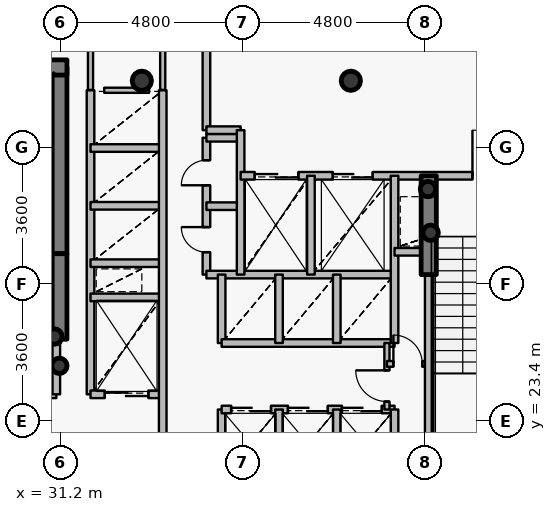
"""IFC4 building model, lengths in metres.
Left out: names, types, materials, properties, quantities, classifications, styles, units other than length and angle.
Written with IfcOpenShell. Run it as: python <this file> out.ifc"""

import sys

from ifc_helpers import new_model, si_unit, direction, frame, frame_2d, origin, origin_2d, place, context, subcontext, project, spatial, rectangle, hollow_circle, extrude, source, transform, mapped, element, fill, save


model = new_model("IFC4")
c1 = context("Model", 3, precision=1e-05, world=origin(), true_north=direction((0.0, 1.0)))
c2 = subcontext(c1, "Body", "Model", "MODEL_VIEW")
j1 = project(units=[si_unit("LENGTHUNIT", "METRE"), si_unit("PLANEANGLEUNIT", "RADIAN")], contexts=[c1])
p1 = place(None, origin())
s1 = spatial("IfcSite", under=j1, at=p1, CompositionType="ELEMENT")
p2 = place(p1, origin())
s2 = spatial("IfcBuilding", under=s1, at=p2, CompositionType="ELEMENT")
p3 = place(p2, frame((0.0, 0.0, 100.95)))
s3 = spatial("IfcBuildingStorey", under=s2, at=p3, CompositionType="ELEMENT", Elevation=100.95)
for number, where, z_axis, x_axis in (
    (1, (38.85, 32.35, 0.0), (0.0, 0.0, 1.0), (1.0, 0.0, 0.0)),
    (2, (33.35, 32.35, 0.0), (0.0, 0.0, 1.0), (1.0, 0.0, 0.0)),
):
    element("IfcColumn", number, at=place(p3, frame(where, z_axis=z_axis, x_axis=x_axis)), inside=s3, PredefinedType="COLUMN", context=c2, shape_type="SweptSolid", body=[
        extrude(hollow_circle(Radius=0.254, WallThickness=0.02, at=origin_2d()), origin(), (0.0, 0.0, 1.0), 3.75),
    ])
p4 = place(p3, frame((31.18, 27.8, 0.0), z_axis=(0.0, 0.0, 1.0), x_axis=(0.0, 1.0, 0.0)))
e3 = element("IfcWall", 3, at=p4, inside=s3, PredefinedType="SHEAR", context=c2, shape_type="SweptSolid", body=[
    extrude(rectangle(XDim=4.9, YDim=0.4, at=frame_2d((2.45, 0.0))), origin(), (0.0, 0.0, 1.0), 3.75),
])
p5 = place(p3, frame((27.28, 32.7, 0.0), z_axis=(0.0, 0.0, 1.0), x_axis=(1.0, 0.0, 0.0)))
e4 = element("IfcWall", 4, at=p5, inside=s3, PredefinedType="SHEAR", context=c2, shape_type="SweptSolid", body=[
    extrude(rectangle(XDim=4.1, YDim=0.4, at=frame_2d((2.05, 0.0))), origin(), (0.0, 0.0, 1.0), 3.75),
])
for number, where, z_axis, x_axis in (
    (5, (31.05, 25.62, 0.0), (0.0, 0.0, 1.0), (1.0, 0.0, 0.0)),
    (6, (31.18, 24.85, 0.0), (0.0, 0.0, 1.0), (1.0, 0.0, 0.0)),
    (7, (40.95, 28.35, 0.0), (0.0, 0.0, 1.0), (1.0, 0.0, 0.0)),
    (8, (40.88, 29.5, 0.0), (0.0, 0.0, 1.0), (1.0, 0.0, 0.0)),
):
    element("IfcColumn", number, at=place(p3, frame(where, z_axis=z_axis, x_axis=x_axis)), inside=s3, PredefinedType="COLUMN", context=c2, shape_type="SweptSolid", body=[
        extrude(hollow_circle(Radius=0.203, WallThickness=0.016, at=origin_2d()), origin(), (0.0, 0.0, 1.0), 3.75),
    ])
p6 = place(p3, frame((31.18, 25.55, 0.0), z_axis=(0.0, 0.0, 1.0), x_axis=(0.0, 1.0, 0.0)))
e9 = element("IfcWall", 9, at=p6, inside=s3, PredefinedType="SHEAR", context=c2, shape_type="SweptSolid", body=[
    extrude(rectangle(XDim=2.25, YDim=0.4, at=frame_2d((1.125, 0.0))), origin(), (0.0, 0.0, 1.0), 3.1),
])
p7 = place(p3, frame((40.9, 27.25, 0.0), z_axis=(0.0, 0.0, 1.0), x_axis=(0.0, 1.0, 0.0)))
e10 = element("IfcWall", 10, at=p7, inside=s3, PredefinedType="SHEAR", context=c2, shape_type="SweptSolid", body=[
    extrude(rectangle(XDim=2.6, YDim=0.4, at=frame_2d((1.3, 0.0))), origin(), (0.0, 0.0, 1.0), 3.1),
])
p8 = place(p3, frame((27.56, 24.1, 0.0), z_axis=(0.0, 0.0, 1.0), x_axis=(1.0, 0.0, 0.0)))
e11 = element("IfcWall", 11, at=p8, inside=s3, PredefinedType="PARTITIONING", context=c2, shape_type="SweptSolid", body=[
    extrude(rectangle(XDim=3.54, YDim=0.2, at=frame_2d((1.77, 0.0))), origin(), (0.0, 0.0, 1.0), 3.5),
])
p9 = place(p8, frame((1.17, 0.0, 0.0)))
e12 = element("IfcOpeningElement", 12, at=p9, cuts=e11, PredefinedType="OPENING", context=c2, shape_type="SweptSolid", body=[
    extrude(rectangle(XDim=1.2, YDim=2.15, at=origin_2d()), frame((0.6, 0.11, 1.075), z_axis=(0.0, -1.0, 0.0), x_axis=(1.0, 0.0, 0.0)), (0.0, 0.0, 1.0), 0.22),
])
p10 = place(p3, frame((31.1, 24.1, 0.0), z_axis=(0.0, 0.0, 1.0), x_axis=(0.0, 1.0, 0.0)))
e13 = element("IfcWall", 13, at=p10, inside=s3, PredefinedType="PARTITIONING", context=c2, shape_type="SweptSolid", body=[
    extrude(rectangle(XDim=1.44, YDim=0.2, at=frame_2d((0.72, 0.0))), origin(), (0.0, 0.0, 1.0), 3.5),
])
p11 = place(p3, frame((32.0, 24.1, 0.0), z_axis=(0.0, 0.0, 1.0), x_axis=(0.0, 1.0, 0.0)))
e14 = element("IfcWall", 14, at=p11, inside=s3, PredefinedType="PARTITIONING", context=c2, shape_type="SweptSolid", body=[
    extrude(rectangle(XDim=8.0, YDim=0.2, at=frame_2d((4.0, 0.0))), origin(), (0.0, 0.0, 1.0), 3.5),
])
p12 = place(p3, frame((32.0, 24.1, 0.0), z_axis=(0.0, 0.0, 1.0), x_axis=(1.0, 0.0, 0.0)))
e15 = element("IfcWall", 15, at=p12, inside=s3, PredefinedType="PARTITIONING", context=c2, shape_type="SweptSolid", body=[
    extrude(rectangle(XDim=1.9, YDim=0.2, at=frame_2d((0.95, 0.0))), origin(), (0.0, 0.0, 1.0), 3.085),
])
p13 = place(p12, frame((0.375, 0.0, 0.0)))
e16 = element("IfcOpeningElement", 16, at=p13, cuts=e15, PredefinedType="OPENING", context=c2, shape_type="SweptSolid", body=[
    extrude(rectangle(XDim=1.15, YDim=2.15, at=origin_2d()), frame((0.575, 0.11, 1.075), z_axis=(0.0, -1.0, 0.0), x_axis=(1.0, 0.0, 0.0)), (0.0, 0.0, 1.0), 0.22),
])
for number, where, z_axis, x_axis in (
    (17, (32.0, 26.65, 0.0), (0.0, 0.0, 1.0), (1.0, 0.0, 0.0)),
    (18, (32.0, 27.55, 0.0), (0.0, 0.0, 1.0), (1.0, 0.0, 0.0)),
    (19, (32.0, 29.06, 0.0), (0.0, 0.0, 1.0), (1.0, 0.0, 0.0)),
    (20, (32.0, 30.58, 0.0), (0.0, 0.0, 1.0), (1.0, 0.0, 0.0)),
):
    element("IfcWall", number, at=place(p3, frame(where, z_axis=z_axis, x_axis=x_axis)), inside=s3, PredefinedType="PARTITIONING", context=c2, shape_type="SweptSolid", body=[
        extrude(rectangle(XDim=1.9, YDim=0.2, at=frame_2d((0.95, 0.0))), origin(), (0.0, 0.0, 1.0), 3.085),
    ])
p14 = place(p3, frame((33.9, 20.6, 0.0), z_axis=(0.0, 0.0, 1.0), x_axis=(0.0, 1.0, 0.0)))
e21 = element("IfcWall", 21, at=p14, inside=s3, PredefinedType="PARTITIONING", context=c2, shape_type="SweptSolid", body=[
    extrude(rectangle(XDim=11.5, YDim=0.2, at=frame_2d((5.75, 0.0))), origin(), (0.0, 0.0, 1.0), 3.085),
])
p15 = place(p3, frame((35.05, 27.25, 0.0), z_axis=(0.0, 0.0, 1.0), x_axis=(0.0, 1.0, 0.0)))
e22 = element("IfcWall", 22, at=p15, inside=s3, PredefinedType="PARTITIONING", context=c2, shape_type="SweptSolid", body=[
    extrude(rectangle(XDim=3.6, YDim=0.2, at=frame_2d((1.8, 0.0))), origin(), (0.0, 0.0, 1.0), 3.5),
])
p16 = place(p15, frame((0.59, 0.0, 0.0)))
e23 = element("IfcOpeningElement", 23, at=p16, cuts=e22, PredefinedType="OPENING", context=c2, shape_type="SweptSolid", body=[
    extrude(rectangle(XDim=0.66, YDim=2.05, at=origin_2d()), frame((0.33, 0.11, 1.025), z_axis=(0.0, -1.0, 0.0), x_axis=(1.0, 0.0, 0.0)), (0.0, 0.0, 1.0), 0.22),
])
p17 = place(p15, frame((2.35, 0.0, 0.0)))
e24 = element("IfcOpeningElement", 24, at=p17, cuts=e22, PredefinedType="OPENING", context=c2, shape_type="SweptSolid", body=[
    extrude(rectangle(XDim=0.66, YDim=2.05, at=origin_2d()), frame((0.33, 0.11, 1.025), z_axis=(0.0, -1.0, 0.0), x_axis=(1.0, 0.0, 0.0)), (0.0, 0.0, 1.0), 0.22),
])
p18 = place(p3, frame((35.05, 27.25, 0.0), z_axis=(0.0, 0.0, 1.0), x_axis=(1.0, 0.0, 0.0)))
e25 = element("IfcWall", 25, at=p18, inside=s3, PredefinedType="PARTITIONING", context=c2, shape_type="SweptSolid", body=[
    extrude(rectangle(XDim=4.95, YDim=0.2, at=frame_2d((2.475, 0.0))), origin(), (0.0, 0.0, 1.0), 3.085),
])
for number, where, z_axis, x_axis in (
    (26, (35.05, 29.05, 0.0), (0.0, 0.0, 1.0), (1.0, 0.0, 0.0)),
    (27, (35.05, 30.85, 0.0), (0.0, 0.0, 1.0), (1.0, 0.0, 0.0)),
):
    element("IfcWall", number, at=place(p3, frame(where, z_axis=z_axis, x_axis=x_axis)), inside=s3, PredefinedType="PARTITIONING", context=c2, shape_type="SweptSolid", body=[
        extrude(rectangle(XDim=0.9, YDim=0.2, at=frame_2d((0.45, 0.0))), origin(), (0.0, 0.0, 1.0), 3.5),
    ])
p19 = place(p3, frame((35.05, 31.05, 0.0), z_axis=(0.0, 0.0, 1.0), x_axis=(0.0, 1.0, 0.0)))
e28 = element("IfcWall", 28, at=p19, inside=s3, PredefinedType="PARTITIONING", context=c2, shape_type="SweptSolid", body=[
    extrude(rectangle(XDim=2.35, YDim=0.2, at=frame_2d((1.175, 0.0))), origin(), (0.0, 0.0, 1.0), 3.085),
])
p20 = place(p3, frame((35.05, 31.05, 0.0), z_axis=(0.0, 0.0, 1.0), x_axis=(1.0, 0.0, 0.0)))
e29 = element("IfcWall", 29, at=p20, inside=s3, PredefinedType="PARTITIONING", context=c2, shape_type="SweptSolid", body=[
    extrude(rectangle(XDim=0.9, YDim=0.2, at=frame_2d((0.45, 0.0))), origin(), (0.0, 0.0, 1.0), 3.5),
])
p21 = place(p3, frame((35.45, 21.9, 0.0), z_axis=(0.0, 0.0, 1.0), x_axis=(0.0, 1.0, 0.0)))
e30 = element("IfcWall", 30, at=p21, inside=s3, PredefinedType="PARTITIONING", context=c2, shape_type="SweptSolid", body=[
    extrude(rectangle(XDim=1.8, YDim=0.2, at=frame_2d((0.9, 0.0))), origin(), (0.0, 0.0, 1.0), 3.5),
])
p22 = place(p3, frame((35.45, 23.7, 0.0), z_axis=(0.0, 0.0, 1.0), x_axis=(1.0, 0.0, 0.0)))
e31 = element("IfcWall", 31, at=p22, inside=s3, PredefinedType="PARTITIONING", context=c2, shape_type="SweptSolid", body=[
    extrude(rectangle(XDim=4.55, YDim=0.2, at=frame_2d((2.275, 0.0))), origin(), (0.0, 0.0, 1.0), 3.085),
])
p23 = place(p22, frame((0.25, 0.0, 0.0)))
e32 = element("IfcOpeningElement", 32, at=p23, cuts=e31, PredefinedType="OPENING", context=c2, shape_type="SweptSolid", body=[
    extrude(rectangle(XDim=1.05, YDim=2.15, at=origin_2d()), frame((0.525, 0.11, 1.075), z_axis=(0.0, -1.0, 0.0), x_axis=(1.0, 0.0, 0.0)), (0.0, 0.0, 1.0), 0.22),
])
p24 = place(p22, frame((1.745, 0.0, 0.0)))
e33 = element("IfcOpeningElement", 33, at=p24, cuts=e31, PredefinedType="OPENING", context=c2, shape_type="SweptSolid", body=[
    extrude(rectangle(XDim=1.05, YDim=2.15, at=origin_2d()), frame((0.525, 0.11, 1.075), z_axis=(0.0, -1.0, 0.0), x_axis=(1.0, 0.0, 0.0)), (0.0, 0.0, 1.0), 0.22),
])
p25 = place(p22, frame((3.165, 0.0, 0.0)))
e34 = element("IfcOpeningElement", 34, at=p25, cuts=e31, PredefinedType="OPENING", context=c2, shape_type="SweptSolid", body=[
    extrude(rectangle(XDim=1.05, YDim=2.15, at=origin_2d()), frame((0.525, 0.11, 1.075), z_axis=(0.0, -1.0, 0.0), x_axis=(1.0, 0.0, 0.0)), (0.0, 0.0, 1.0), 0.22),
])
p26 = place(p3, frame((35.45, 25.45, 0.0), z_axis=(0.0, 0.0, 1.0), x_axis=(0.0, 1.0, 0.0)))
e35 = element("IfcWall", 35, at=p26, inside=s3, PredefinedType="PARTITIONING", context=c2, shape_type="SweptSolid", body=[
    extrude(rectangle(XDim=1.8, YDim=0.2, at=frame_2d((0.9, 0.0))), origin(), (0.0, 0.0, 1.0), 3.5),
])
p27 = place(p3, frame((35.45, 25.45, 0.0), z_axis=(0.0, 0.0, 1.0), x_axis=(1.0, 0.0, 0.0)))
e36 = element("IfcWall", 36, at=p27, inside=s3, PredefinedType="PARTITIONING", context=c2, shape_type="SweptSolid", body=[
    extrude(rectangle(XDim=4.55, YDim=0.2, at=frame_2d((2.275, 0.0))), origin(), (0.0, 0.0, 1.0), 3.085),
])
p28 = place(p3, frame((35.95, 27.25, 0.0), z_axis=(0.0, 0.0, 1.0), x_axis=(0.0, 1.0, 0.0)))
e37 = element("IfcWall", 37, at=p28, inside=s3, PredefinedType="PARTITIONING", context=c2, shape_type="SweptSolid", body=[
    extrude(rectangle(XDim=3.8, YDim=0.2, at=frame_2d((1.9, 0.0))), origin(), (0.0, 0.0, 1.0), 3.5),
])
p29 = place(p3, frame((35.95, 29.85, 0.0), z_axis=(0.0, 0.0, 1.0), x_axis=(1.0, 0.0, 0.0)))
e38 = element("IfcWall", 38, at=p29, inside=s3, PredefinedType="PARTITIONING", context=c2, shape_type="SweptSolid", body=[
    extrude(rectangle(XDim=8.49, YDim=0.2, at=frame_2d((4.245, 0.0))), origin(), (0.0, 0.0, 1.0), 3.085),
])
p30 = place(p29, frame((6.1, 0.0, 0.0)))
e39 = element("IfcOpeningElement", 39, at=p30, cuts=e38, PredefinedType="OPENING", context=c2, shape_type="SweptSolid", body=[
    extrude(rectangle(XDim=1.2, YDim=2.15, at=origin_2d()), frame((0.6, 0.11, 1.075), z_axis=(0.0, -1.0, 0.0), x_axis=(1.0, 0.0, 0.0)), (0.0, 0.0, 1.0), 0.22),
])
p31 = place(p29, frame((0.37, 0.0, 0.0)))
e40 = element("IfcOpeningElement", 40, at=p31, cuts=e38, PredefinedType="OPENING", context=c2, shape_type="SweptSolid", body=[
    extrude(rectangle(XDim=1.15, YDim=2.15, at=origin_2d()), frame((0.575, 0.11, 1.075), z_axis=(0.0, -1.0, 0.0), x_axis=(1.0, 0.0, 0.0)), (0.0, 0.0, 1.0), 0.22),
])
p32 = place(p29, frame((2.425, 0.0, 0.0)))
e41 = element("IfcOpeningElement", 41, at=p32, cuts=e38, PredefinedType="OPENING", context=c2, shape_type="SweptSolid", body=[
    extrude(rectangle(XDim=1.05, YDim=2.15, at=origin_2d()), frame((0.525, 0.11, 1.075), z_axis=(0.0, -1.0, 0.0), x_axis=(1.0, 0.0, 0.0)), (0.0, 0.0, 1.0), 0.22),
])
for number, where, z_axis, x_axis in (
    (42, (36.96, 21.9, 0.0), (0.0, 0.0, 1.0), (0.0, 1.0, 0.0)),
    (43, (36.96, 25.45, 0.0), (0.0, 0.0, 1.0), (0.0, 1.0, 0.0)),
):
    element("IfcWall", number, at=place(p3, frame(where, z_axis=z_axis, x_axis=x_axis)), inside=s3, PredefinedType="PARTITIONING", context=c2, shape_type="SweptSolid", body=[
        extrude(rectangle(XDim=1.8, YDim=0.2, at=frame_2d((0.9, 0.0))), origin(), (0.0, 0.0, 1.0), 3.5),
    ])
p33 = place(p3, frame((37.8, 27.25, 0.0), z_axis=(0.0, 0.0, 1.0), x_axis=(0.0, 1.0, 0.0)))
e44 = element("IfcWall", 44, at=p33, inside=s3, PredefinedType="PARTITIONING", context=c2, shape_type="SweptSolid", body=[
    extrude(rectangle(XDim=2.6, YDim=0.2, at=frame_2d((1.3, 0.0))), origin(), (0.0, 0.0, 1.0), 3.5),
])
for number, where, z_axis, x_axis in (
    (45, (38.48, 21.9, 0.0), (0.0, 0.0, 1.0), (0.0, 1.0, 0.0)),
    (46, (38.48, 25.45, 0.0), (0.0, 0.0, 1.0), (0.0, 1.0, 0.0)),
):
    element("IfcWall", number, at=place(p3, frame(where, z_axis=z_axis, x_axis=x_axis)), inside=s3, PredefinedType="PARTITIONING", context=c2, shape_type="SweptSolid", body=[
        extrude(rectangle(XDim=1.8, YDim=0.2, at=frame_2d((0.9, 0.0))), origin(), (0.0, 0.0, 1.0), 3.5),
    ])
p34 = place(p3, frame((39.8, 23.7, 0.0), z_axis=(0.0, 0.0, 1.0), x_axis=(0.0, 1.0, 0.0)))
e47 = element("IfcWall", 47, at=p34, inside=s3, PredefinedType="PARTITIONING", context=c2, shape_type="SweptSolid", body=[
    extrude(rectangle(XDim=1.75, YDim=0.135, at=frame_2d((0.875, 0.0))), origin(), (0.0, 0.0, 1.0), 3.5),
])
p35 = place(p34, frame((0.21, 0.0, 0.0)))
e48 = element("IfcOpeningElement", 48, at=p35, cuts=e47, PredefinedType="OPENING", context=c2, shape_type="SweptSolid", body=[
    extrude(rectangle(XDim=0.82, YDim=2.1, at=origin_2d()), frame((0.41, 0.078, 1.05), z_axis=(0.0, -1.0, 0.0), x_axis=(1.0, 0.0, 0.0)), (0.0, 0.0, 1.0), 0.155),
])
p36 = place(p3, frame((39.8, 24.9, 0.0), z_axis=(0.0, 0.0, 1.0), x_axis=(1.0, 0.0, 0.0)))
e49 = element("IfcWall", 49, at=p36, inside=s3, PredefinedType="PARTITIONING", context=c2, shape_type="SweptSolid", body=[
    extrude(rectangle(XDim=1.1, YDim=0.15, at=frame_2d((0.55, 0.0))), origin(), (0.0, 0.0, 1.0), 3.5),
])
p37 = place(p36, frame((0.17, 0.0, 0.0)))
e50 = element("IfcOpeningElement", 50, at=p37, cuts=e49, PredefinedType="OPENING", context=c2, shape_type="SweptSolid", body=[
    extrude(rectangle(XDim=0.76, YDim=2.1, at=origin_2d()), frame((0.38, 0.085, 1.05), z_axis=(0.0, -1.0, 0.0), x_axis=(1.0, 0.0, 0.0)), (0.0, 0.0, 1.0), 0.17),
])
p38 = place(p3, frame((40.0, 21.9, 0.0), z_axis=(0.0, 0.0, 1.0), x_axis=(0.0, 1.0, 0.0)))
e51 = element("IfcWall", 51, at=p38, inside=s3, PredefinedType="PARTITIONING", context=c2, shape_type="SweptSolid", body=[
    extrude(rectangle(XDim=1.8, YDim=0.2, at=frame_2d((0.9, 0.0))), origin(), (0.0, 0.0, 1.0), 3.5),
])
p39 = place(p3, frame((40.0, 25.45, 0.0), z_axis=(0.0, 0.0, 1.0), x_axis=(0.0, 1.0, 0.0)))
e52 = element("IfcWall", 52, at=p39, inside=s3, PredefinedType="PARTITIONING", context=c2, shape_type="SweptSolid", body=[
    extrude(rectangle(XDim=4.4, YDim=0.2, at=frame_2d((2.2, 0.0))), origin(), (0.0, 0.0, 1.0), 3.5),
])
p40 = place(p3, frame((40.0, 27.85, 0.0), z_axis=(0.0, 0.0, 1.0), x_axis=(1.0, 0.0, 0.0)))
e53 = element("IfcWall", 53, at=p40, inside=s3, PredefinedType="PARTITIONING", context=c2, shape_type="SweptSolid", body=[
    extrude(rectangle(XDim=0.9, YDim=0.2, at=frame_2d((0.45, 0.0))), origin(), (0.0, 0.0, 1.0), 3.5),
])
p41 = place(p3, frame((40.9, 21.33, 0.0), z_axis=(0.0, 0.0, 1.0), x_axis=(0.0, 1.0, 0.0)))
e54 = element("IfcWall", 54, at=p41, inside=s3, PredefinedType="PARTITIONING", context=c2, shape_type="SweptSolid", body=[
    extrude(rectangle(XDim=5.91, YDim=0.2, at=frame_2d((2.955, 0.0))), origin(), (0.0, 0.0, 1.0), 3.035),
])
p42 = place(p3, frame((32.36, 32.1, 0.0), z_axis=(0.0, 0.0, 1.0), x_axis=(1.0, 0.0, 0.0)))
e55 = element("IfcWall", 55, at=p42, inside=s3, PredefinedType="PARTITIONING", context=c2, shape_type="SweptSolid", body=[
    extrude(rectangle(XDim=1.18, YDim=0.135, at=frame_2d((0.59, 0.0))), origin(), (0.0, 0.0, 1.0), 3.085),
])
p43 = place(p3, frame((32.0, 33.14, 0.0), z_axis=(0.0, 0.0, 1.0), x_axis=(0.0, -1.0, 0.0)))
e56 = element("IfcWall", 56, at=p43, inside=s3, PredefinedType="PARTITIONING", context=c2, shape_type="SweptSolid", body=[
    extrude(rectangle(XDim=1.03, YDim=0.135, at=frame_2d((0.515, 0.0))), origin(), (0.0, 0.0, 1.0), 3.035),
])
p44 = place(p3, frame((33.9, 32.11, 0.0), z_axis=(0.0, 0.0, 1.0), x_axis=(0.0, 1.0, 0.0)))
e57 = element("IfcWall", 57, at=p44, inside=s3, PredefinedType="PARTITIONING", context=c2, shape_type="SweptSolid", body=[
    extrude(rectangle(XDim=1.03, YDim=0.135, at=frame_2d((0.515, 0.0))), origin(), (0.0, 0.0, 1.0), 3.085),
])
m1 = source(origin(), c2, "Body", "SweptSolid", [
    extrude(rectangle(XDim=1.2, YDim=2.15, at=origin_2d()), frame((0.6, 0.025, 1.075), z_axis=(0.0, -1.0, 0.0), x_axis=(1.0, 0.0, 0.0)), (0.0, 0.0, 1.0), 0.05),
])
p45 = place(p30, origin())
e58 = element("IfcDoor", 58, at=p45, inside=s3, OperationType="SINGLE_SWING_LEFT", PredefinedType="DOOR", context=c2, shape_type="MappedRepresentation", body=[
    mapped(m1, transform((0.0, 0.0, 0.0), x_axis=(1.0, 0.0, 0.0), y_axis=(0.0, 1.0, 0.0), z_axis=(0.0, 0.0, 1.0), scale=1.0)),
])
fill(e39, e58)
m2 = source(origin(), c2, "Body", "SweptSolid", [
    extrude(rectangle(XDim=1.15, YDim=2.15, at=origin_2d()), frame((0.575, 0.025, 1.075), z_axis=(0.0, -1.0, 0.0), x_axis=(1.0, 0.0, 0.0)), (0.0, 0.0, 1.0), 0.05),
])
p46 = place(p31, origin())
e59 = element("IfcDoor", 59, at=p46, inside=s3, OperationType="DOUBLE_DOOR_SLIDING", PredefinedType="USERDEFINED", context=c2, shape_type="MappedRepresentation", body=[
    mapped(m2, transform((0.0, 0.0, 0.0), x_axis=(1.0, 0.0, 0.0), y_axis=(0.0, 1.0, 0.0), z_axis=(0.0, 0.0, 1.0), scale=1.0)),
])
fill(e40, e59)
p47 = place(p13, origin())
e60 = element("IfcDoor", 60, at=p47, inside=s3, OperationType="DOUBLE_DOOR_SLIDING", PredefinedType="USERDEFINED", context=c2, shape_type="MappedRepresentation", body=[
    mapped(m2, transform((0.0, 0.0, 0.0), x_axis=(1.0, 0.0, 0.0), y_axis=(0.0, 1.0, 0.0), z_axis=(0.0, 0.0, 1.0), scale=1.0)),
])
fill(e16, e60)
m3 = source(origin(), c2, "Body", "SweptSolid", [
    extrude(rectangle(XDim=1.05, YDim=2.15, at=origin_2d()), frame((0.525, 0.025, 1.075), z_axis=(0.0, -1.0, 0.0), x_axis=(1.0, 0.0, 0.0)), (0.0, 0.0, 1.0), 0.05),
])
p48 = place(p32, origin())
e61 = element("IfcDoor", 61, at=p48, inside=s3, OperationType="DOUBLE_DOOR_SLIDING", PredefinedType="USERDEFINED", context=c2, shape_type="MappedRepresentation", body=[
    mapped(m3, transform((0.0, 0.0, 0.0), x_axis=(1.0, 0.0, 0.0), y_axis=(0.0, 1.0, 0.0), z_axis=(0.0, 0.0, 1.0), scale=1.0)),
])
fill(e41, e61)
p49 = place(p23, origin())
e62 = element("IfcDoor", 62, at=p49, inside=s3, OperationType="DOUBLE_DOOR_SLIDING", PredefinedType="USERDEFINED", context=c2, shape_type="MappedRepresentation", body=[
    mapped(m3, transform((0.0, 0.0, 0.0), x_axis=(1.0, 0.0, 0.0), y_axis=(0.0, 1.0, 0.0), z_axis=(0.0, 0.0, 1.0), scale=1.0)),
])
fill(e32, e62)
p50 = place(p24, origin())
e63 = element("IfcDoor", 63, at=p50, inside=s3, OperationType="DOUBLE_DOOR_SLIDING", PredefinedType="USERDEFINED", context=c2, shape_type="MappedRepresentation", body=[
    mapped(m3, transform((0.0, 0.0, 0.0), x_axis=(1.0, 0.0, 0.0), y_axis=(0.0, 1.0, 0.0), z_axis=(0.0, 0.0, 1.0), scale=1.0)),
])
fill(e33, e63)
p51 = place(p25, origin())
e64 = element("IfcDoor", 64, at=p51, inside=s3, OperationType="DOUBLE_DOOR_SLIDING", PredefinedType="USERDEFINED", context=c2, shape_type="MappedRepresentation", body=[
    mapped(m3, transform((0.0, 0.0, 0.0), x_axis=(1.0, 0.0, 0.0), y_axis=(0.0, 1.0, 0.0), z_axis=(0.0, 0.0, 1.0), scale=1.0)),
])
fill(e34, e64)
m4 = source(origin(), c2, "Body", "SweptSolid", [
    extrude(rectangle(XDim=0.66, YDim=2.05, at=origin_2d()), frame((0.33, 0.025, 1.025), z_axis=(0.0, -1.0, 0.0), x_axis=(1.0, 0.0, 0.0)), (0.0, 0.0, 1.0), 0.05),
])
p52 = place(p16, origin())
e65 = element("IfcDoor", 65, at=p52, inside=s3, OperationType="SINGLE_SWING_RIGHT", PredefinedType="USERDEFINED", context=c2, shape_type="MappedRepresentation", body=[
    mapped(m4, transform((0.0, 0.0, 0.0), x_axis=(1.0, 0.0, 0.0), y_axis=(0.0, 1.0, 0.0), z_axis=(0.0, 0.0, 1.0), scale=1.0)),
])
fill(e23, e65)
p53 = place(p17, origin())
e66 = element("IfcDoor", 66, at=p53, inside=s3, OperationType="SINGLE_SWING_LEFT", PredefinedType="USERDEFINED", context=c2, shape_type="MappedRepresentation", body=[
    mapped(m4, transform((0.0, 0.0, 0.0), x_axis=(1.0, 0.0, 0.0), y_axis=(0.0, 1.0, 0.0), z_axis=(0.0, 0.0, 1.0), scale=1.0)),
])
fill(e24, e66)
m5 = source(origin(), c2, "Body", "SweptSolid", [
    extrude(rectangle(XDim=0.82, YDim=2.1, at=origin_2d()), frame((0.41, 0.025, 1.05), z_axis=(0.0, -1.0, 0.0), x_axis=(1.0, 0.0, 0.0)), (0.0, 0.0, 1.0), 0.05),
])
p54 = place(p35, origin())
e67 = element("IfcDoor", 67, at=p54, inside=s3, OperationType="SINGLE_SWING_RIGHT", PredefinedType="DOOR", context=c2, shape_type="MappedRepresentation", body=[
    mapped(m5, transform((0.0, 0.0, 0.0), x_axis=(1.0, 0.0, 0.0), y_axis=(0.0, 1.0, 0.0), z_axis=(0.0, 0.0, 1.0), scale=1.0)),
])
fill(e48, e67)
m6 = source(origin(), c2, "Body", "SweptSolid", [
    extrude(rectangle(XDim=0.76, YDim=2.1, at=origin_2d()), frame((0.38, 0.025, 1.05), z_axis=(0.0, -1.0, 0.0), x_axis=(1.0, 0.0, 0.0)), (0.0, 0.0, 1.0), 0.05),
])
p55 = place(p37, origin())
e68 = element("IfcDoor", 68, at=p55, inside=s3, OperationType="SINGLE_SWING_LEFT", PredefinedType="DOOR", context=c2, shape_type="MappedRepresentation", body=[
    mapped(m6, transform((0.0, 0.0, 0.0), x_axis=(1.0, 0.0, 0.0), y_axis=(0.0, 1.0, 0.0), z_axis=(0.0, 0.0, 1.0), scale=1.0)),
])
fill(e50, e68)
save(model, sys.argv[1])
